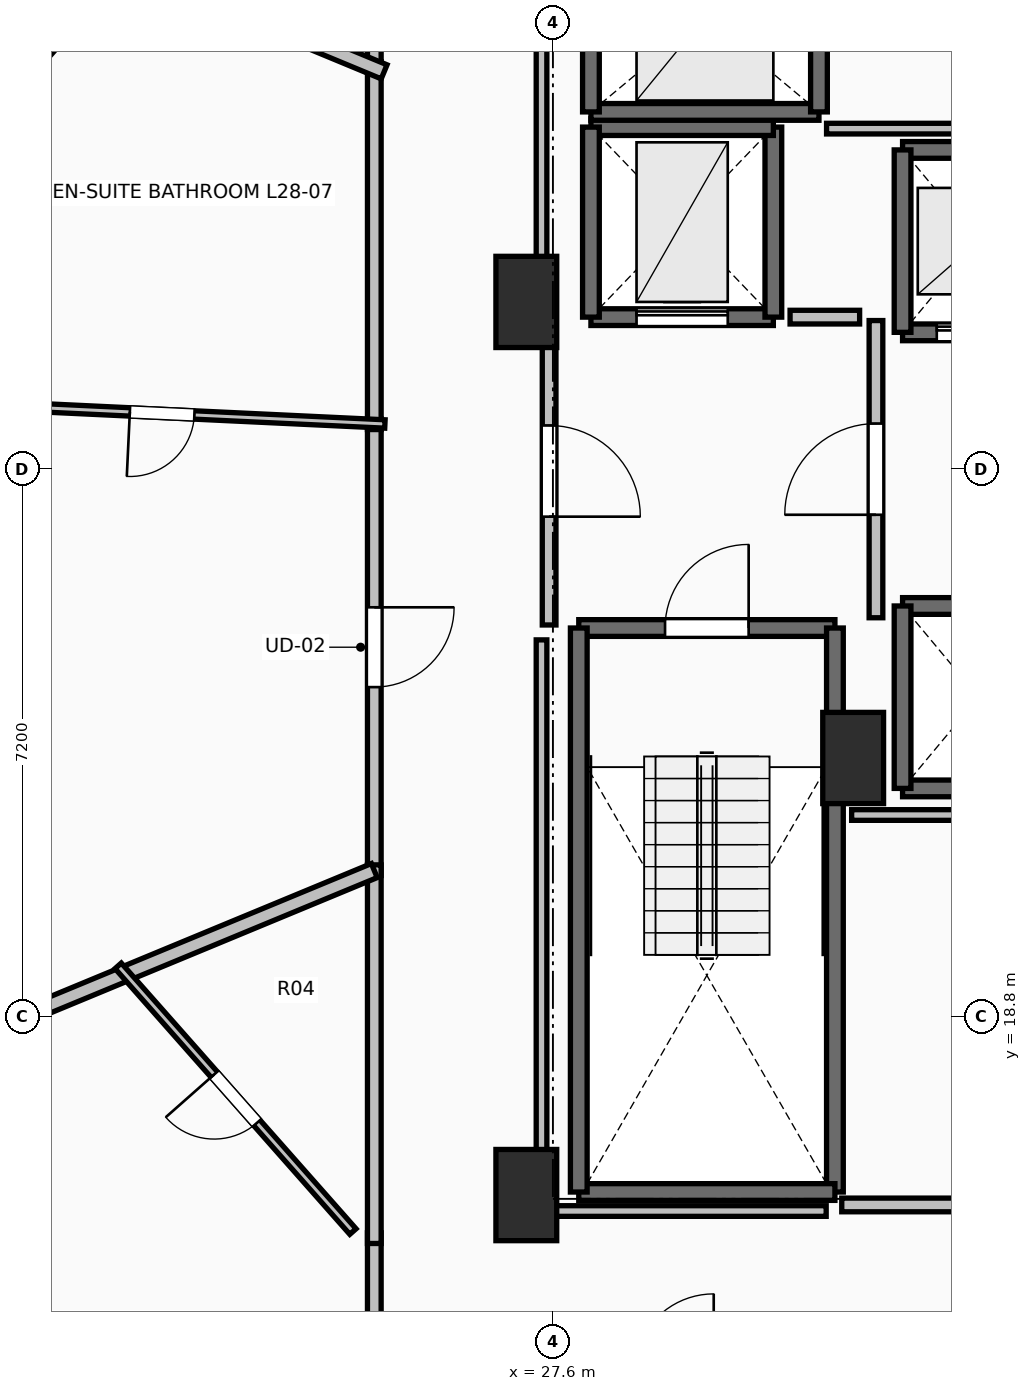
"""IFC4 building model, lengths in metres.
Left out: names, types, materials, properties, quantities, classifications, styles, units other than length and angle.
Written with IfcOpenShell. Run it as: python <this file> out.ifc"""

import sys

from ifc_helpers import new_model, si_unit, direction, frame, frame_2d, origin, origin_2d, place, context, subcontext, project, spatial, rectangle, extrude, element, fill, save


model = new_model("IFC4")
c1 = context("Model", 3, precision=1e-05, world=origin(), true_north=direction((0.0, 1.0)))
c2 = subcontext(c1, "Body", "Model", "MODEL_VIEW")
j1 = project(units=[si_unit("LENGTHUNIT", "METRE"), si_unit("PLANEANGLEUNIT", "RADIAN")], contexts=[c1])
p1 = place(None, origin())
s1 = spatial("IfcSite", under=j1, at=p1, CompositionType="ELEMENT")
p2 = place(p1, origin())
s2 = spatial("IfcBuilding", under=s1, at=p2, CompositionType="ELEMENT")
p3 = place(p2, frame((0.0, 0.0, 106.8)))
s3 = spatial("IfcBuildingStorey", under=s2, at=p3, CompositionType="ELEMENT", Elevation=106.8)
for number, where, z_axis, x_axis in (
    (1, (27.25, 16.45, 0.0), (0.0, 0.0, 1.0), (1.0, 0.0, 0.0)),
    (2, (27.25, 28.2, 0.0), (0.0, 0.0, 1.0), (1.0, 0.0, 0.0)),
    (3, (31.55, 22.2, 0.0), (0.0, 0.0, 1.0), (1.0, 0.0, 0.0)),
):
    element("IfcColumn", number, at=place(p3, frame(where, z_axis=z_axis, x_axis=x_axis)), inside=s3, PredefinedType="PILASTER", context=c2, shape_type="SweptSolid", body=[
        extrude(rectangle(XDim=0.8, YDim=1.2, at=origin_2d()), origin(), (0.0, 0.0, 1.0), 3.5),
    ])
p4 = place(p3, frame((27.94, 23.91, 0.0), z_axis=(0.0, 0.0, 1.0), x_axis=(1.0, 0.0, 0.0)))
e4 = element("IfcWall", 4, at=p4, inside=s3, PredefinedType="SOLIDWALL", context=c2, shape_type="SweptSolid", body=[
    extrude(rectangle(XDim=3.37, YDim=0.22, at=frame_2d((1.685, 0.0))), origin(), (0.0, 0.0, 1.0), 3.24),
])
p5 = place(p4, frame((1.135, 0.0, 0.0)))
e5 = element("IfcOpeningElement", 5, at=p5, cuts=e4, PredefinedType="OPENING", context=c2, shape_type="SweptSolid", body=[
    extrude(rectangle(XDim=1.1, YDim=2.15, at=frame_2d((0.55, 1.075))), frame((0.0, 0.125, 0.0), z_axis=(0.0, -1.0, 0.0), x_axis=(1.0, 0.0, 0.0)), (0.0, 0.0, 1.0), 0.25),
])
p6 = place(p3, frame((31.31, 23.91, 0.0), z_axis=(0.0, 0.0, 1.0), x_axis=(0.0, -1.0, 0.0)))
e6 = element("IfcWall", 6, at=p6, inside=s3, PredefinedType="SOLIDWALL", context=c2, shape_type="SweptSolid", body=[
    extrude(rectangle(XDim=7.42, YDim=0.22, at=frame_2d((3.71, 0.0))), origin(), (0.0, 0.0, 1.0), 3.24),
])
p7 = place(p3, frame((31.31, 16.49, 0.0), z_axis=(0.0, 0.0, 1.0), x_axis=(-1.0, 0.0, 0.0)))
e7 = element("IfcWall", 7, at=p7, inside=s3, PredefinedType="SOLIDWALL", context=c2, shape_type="SweptSolid", body=[
    extrude(rectangle(XDim=3.37, YDim=0.22, at=frame_2d((1.685, 0.0))), origin(), (0.0, 0.0, 1.0), 3.24),
])
p8 = place(p3, frame((27.94, 16.49, 0.0), z_axis=(0.0, 0.0, 1.0), x_axis=(0.0, 1.0, 0.0)))
e8 = element("IfcWall", 8, at=p8, inside=s3, PredefinedType="SOLIDWALL", context=c2, shape_type="SweptSolid", body=[
    extrude(rectangle(XDim=7.42, YDim=0.22, at=frame_2d((3.71, 0.0))), origin(), (0.0, 0.0, 1.0), 3.24),
])
p9 = place(p3, frame((32.2, 27.8, 0.0), z_axis=(0.0, 0.0, 1.0), x_axis=(1.0, 0.0, 0.0)))
e9 = element("IfcWall", 9, at=p9, inside=s3, PredefinedType="SOLIDWALL", context=c2, shape_type="SweptSolid", body=[
    extrude(rectangle(XDim=2.0, YDim=0.22, at=frame_2d((1.0, 0.0))), origin(), (0.0, 0.0, 1.0), 3.24),
])
p10 = place(p9, frame((0.45, 0.0, 0.0)))
e10 = element("IfcOpeningElement", 10, at=p10, cuts=e9, PredefinedType="OPENING", context=c2, shape_type="SweptSolid", body=[
    extrude(rectangle(XDim=1.1, YDim=2.2, at=frame_2d((0.55, 1.1))), frame((0.0, 0.125, 0.0), z_axis=(0.0, -1.0, 0.0), x_axis=(1.0, 0.0, 0.0)), (0.0, 0.0, 1.0), 0.25),
])
p11 = place(p3, frame((34.2, 30.2, 0.0), z_axis=(0.0, 0.0, 1.0), x_axis=(-1.0, 0.0, 0.0)))
e11 = element("IfcWall", 11, at=p11, inside=s3, PredefinedType="SOLIDWALL", context=c2, shape_type="SweptSolid", body=[
    extrude(rectangle(XDim=2.0, YDim=0.22, at=frame_2d((1.0, 0.0))), origin(), (0.0, 0.0, 1.0), 3.24),
])
p12 = place(p3, frame((32.2, 30.2, 0.0), z_axis=(0.0, 0.0, 1.0), x_axis=(0.0, -1.0, 0.0)))
e12 = element("IfcWall", 12, at=p12, inside=s3, PredefinedType="SOLIDWALL", context=c2, shape_type="SweptSolid", body=[
    extrude(rectangle(XDim=2.4, YDim=0.22, at=frame_2d((1.2, 0.0))), origin(), (0.0, 0.0, 1.0), 3.24),
])
for number, where, z_axis, x_axis in (
    (13, (32.2, 21.8, 0.0), (0.0, 0.0, 1.0), (1.0, 0.0, 0.0)),
    (14, (34.2, 24.2, 0.0), (0.0, 0.0, 1.0), (-1.0, 0.0, 0.0)),
):
    element("IfcWall", number, at=place(p3, frame(where, z_axis=z_axis, x_axis=x_axis)), inside=s3, PredefinedType="SOLIDWALL", context=c2, shape_type="SweptSolid", body=[
        extrude(rectangle(XDim=2.0, YDim=0.22, at=frame_2d((1.0, 0.0))), origin(), (0.0, 0.0, 1.0), 3.24),
    ])
p13 = place(p3, frame((32.2, 24.2, 0.0), z_axis=(0.0, 0.0, 1.0), x_axis=(0.0, -1.0, 0.0)))
e15 = element("IfcWall", 15, at=p13, inside=s3, PredefinedType="SOLIDWALL", context=c2, shape_type="SweptSolid", body=[
    extrude(rectangle(XDim=2.4, YDim=0.22, at=frame_2d((1.2, 0.0))), origin(), (0.0, 0.0, 1.0), 3.24),
])
p14 = place(p3, frame((28.1, 28.0, 0.0), z_axis=(0.0, 0.0, 1.0), x_axis=(1.0, 0.0, 0.0)))
e16 = element("IfcWall", 16, at=p14, inside=s3, PredefinedType="SHEAR", context=c2, shape_type="SweptSolid", body=[
    extrude(rectangle(XDim=2.4, YDim=0.22, at=frame_2d((1.2, 0.0))), origin(), (0.0, 0.0, 1.0), 3.24),
])
p15 = place(p14, frame((0.6, 0.0, 0.0)))
e17 = element("IfcOpeningElement", 17, at=p15, cuts=e16, PredefinedType="OPENING", context=c2, shape_type="SweptSolid", body=[
    extrude(rectangle(XDim=1.2, YDim=2.2, at=frame_2d((0.6, 1.1))), frame((0.0, 0.125, 0.0), z_axis=(0.0, -1.0, 0.0), x_axis=(1.0, 0.0, 0.0)), (0.0, 0.0, 1.0), 0.25),
])
p16 = place(p3, frame((30.5, 28.0, 0.0), z_axis=(0.0, 0.0, 1.0), x_axis=(0.0, 1.0, 0.0)))
e18 = element("IfcWall", 18, at=p16, inside=s3, PredefinedType="SHEAR", context=c2, shape_type="SweptSolid", body=[
    extrude(rectangle(XDim=2.5, YDim=0.22, at=frame_2d((1.25, 0.0))), origin(), (0.0, 0.0, 1.0), 3.24),
])
p17 = place(p3, frame((30.5, 30.5, 0.0), z_axis=(0.0, 0.0, 1.0), x_axis=(-1.0, 0.0, 0.0)))
e19 = element("IfcWall", 19, at=p17, inside=s3, PredefinedType="SHEAR", context=c2, shape_type="SweptSolid", body=[
    extrude(rectangle(XDim=2.4, YDim=0.22, at=frame_2d((1.2, 0.0))), origin(), (0.0, 0.0, 1.0), 3.24),
])
p18 = place(p3, frame((28.1, 30.5, 0.0), z_axis=(0.0, 0.0, 1.0), x_axis=(0.0, -1.0, 0.0)))
e20 = element("IfcWall", 20, at=p18, inside=s3, PredefinedType="SHEAR", context=c2, shape_type="SweptSolid", body=[
    extrude(rectangle(XDim=2.5, YDim=0.22, at=frame_2d((1.25, 0.0))), origin(), (0.0, 0.0, 1.0), 3.24),
])
p19 = place(p3, frame((28.1, 30.7, 0.0), z_axis=(0.0, 0.0, 1.0), x_axis=(1.0, 0.0, 0.0)))
e21 = element("IfcWall", 21, at=p19, inside=s3, PredefinedType="SOLIDWALL", context=c2, shape_type="SweptSolid", body=[
    extrude(rectangle(XDim=3.0, YDim=0.22, at=frame_2d((1.5, 0.0))), origin(), (0.0, 0.0, 1.0), 3.24),
])
for number, where, z_axis, x_axis in (
    (22, (31.1, 30.7, 0.0), (0.0, 0.0, 1.0), (0.0, 1.0, 0.0)),
    (23, (28.1, 33.2, 0.0), (0.0, 0.0, 1.0), (0.0, -1.0, 0.0)),
):
    element("IfcWall", number, at=place(p3, frame(where, z_axis=z_axis, x_axis=x_axis)), inside=s3, PredefinedType="SOLIDWALL", context=c2, shape_type="SweptSolid", body=[
        extrude(rectangle(XDim=2.5, YDim=0.22, at=frame_2d((1.25, 0.0))), origin(), (0.0, 0.0, 1.0), 3.24),
    ])
p20 = place(p3, frame((31.85, 24.045, 0.0), z_axis=(0.0, 0.0, 1.0), x_axis=(0.0, 1.0, 0.0)))
e24 = element("IfcWall", 24, at=p20, inside=s3, PredefinedType="PARTITIONING", context=c2, shape_type="SweptSolid", body=[
    extrude(rectangle(XDim=3.91, YDim=0.18, at=frame_2d((1.955, 0.0))), origin(), (0.0, 0.0, 1.0), 3.24),
])
p21 = place(p20, frame((1.355, 0.0, 0.0)))
e25 = element("IfcOpeningElement", 25, at=p21, cuts=e24, PredefinedType="OPENING", context=c2, shape_type="SweptSolid", body=[
    extrude(rectangle(XDim=1.2, YDim=2.15, at=frame_2d((0.6, 1.075))), frame((0.0, 0.105, 0.0), z_axis=(0.0, -1.0, 0.0), x_axis=(1.0, 0.0, 0.0)), (0.0, 0.0, 1.0), 0.21),
])
p22 = place(p3, frame((27.55, 28.0, 0.0), z_axis=(0.0, 0.0, 1.0), x_axis=(0.0, -1.0, 0.0)))
e26 = element("IfcWall", 26, at=p22, inside=s3, PredefinedType="PARTITIONING", context=c2, shape_type="SweptSolid", body=[
    extrude(rectangle(XDim=4.05, YDim=0.18, at=frame_2d((2.025, 0.0))), origin(), (0.0, 0.0, 1.0), 3.24),
])
p23 = place(p22, frame((1.425, 0.0, 0.0)))
e27 = element("IfcOpeningElement", 27, at=p23, cuts=e26, PredefinedType="OPENING", context=c2, shape_type="SweptSolid", body=[
    extrude(rectangle(XDim=1.2, YDim=2.15, at=frame_2d((0.6, 1.075))), frame((0.0, 0.105, 0.0), z_axis=(0.0, -1.0, 0.0), x_axis=(1.0, 0.0, 0.0)), (0.0, 0.0, 1.0), 0.21),
])
p24 = place(p3, frame((31.4, 16.32, 0.0), z_axis=(0.0, 0.0, 1.0), x_axis=(1.0, 0.0, 0.0)))
e28 = element("IfcWall", 28, at=p24, inside=s3, PredefinedType="PARTITIONING", context=c2, shape_type="SweptSolid", body=[
    extrude(rectangle(XDim=4.4, YDim=0.18, at=frame_2d((2.2, 0.0))), origin(), (0.0, 0.0, 1.0), 3.24),
])
p25 = place(p24, frame((1.775, 0.0, 0.0)))
e29 = element("IfcOpeningElement", 29, at=p25, cuts=e28, PredefinedType="OPENING", context=c2, shape_type="SweptSolid", body=[
    extrude(rectangle(XDim=0.85, YDim=2.1, at=frame_2d((0.425, 1.05))), frame((0.0, 0.105, 0.0), z_axis=(0.0, -1.0, 0.0), x_axis=(1.0, 0.0, 0.0)), (0.0, 0.0, 1.0), 0.21),
])
p26 = place(p3, frame((25.25, 35.034, 0.0), z_axis=(0.0, 0.0, 1.0), x_axis=(0.0, -1.0, 0.0)))
e30 = element("IfcWall", 30, at=p26, inside=s3, PredefinedType="PARTITIONING", context=c2, shape_type="SweptSolid", body=[
    extrude(rectangle(XDim=3.813, YDim=0.18, at=frame_2d((1.906, 0.0))), origin(), (0.0, 0.0, 1.0), 2.432),
])
p27 = place(p26, frame((1.406, 0.0, 0.0)))
e31 = element("IfcOpeningElement", 31, at=p27, cuts=e30, PredefinedType="OPENING", context=c2, shape_type="SweptSolid", body=[
    extrude(rectangle(XDim=1.0, YDim=2.15, at=frame_2d((0.5, 1.075))), frame((0.0, 0.105, 0.0), z_axis=(0.0, -1.0, 0.0), x_axis=(1.0, 0.0, 0.0)), (0.0, 0.0, 1.0), 0.21),
])
p28 = place(p3, frame((25.25, 26.661, 0.0), z_axis=(0.0, 0.0, 1.0), x_axis=(0.0, -1.0, 0.0)))
e32 = element("IfcWall", 32, at=p28, inside=s3, PredefinedType="PARTITIONING", context=c2, shape_type="SweptSolid", body=[
    extrude(rectangle(XDim=6.007, YDim=0.18, at=frame_2d((3.003, 0.0))), origin(), (0.0, 0.0, 1.0), 3.24),
])
p29 = place(p28, frame((2.479, 0.0, 0.0)))
e33 = element("IfcOpeningElement", 33, at=p29, cuts=e32, PredefinedType="OPENING", context=c2, shape_type="SweptSolid", body=[
    extrude(rectangle(XDim=1.05, YDim=2.2, at=frame_2d((0.525, 1.1))), frame((0.0, 0.105, 0.0), z_axis=(0.0, -1.0, 0.0), x_axis=(1.0, 0.0, 0.0)), (0.0, 0.0, 1.0), 0.21),
])
p30 = place(p3, frame((25.25, 31.361, 0.0), z_axis=(0.0, 0.0, 1.0), x_axis=(0.0, -1.0, 0.0)))
e34 = element("IfcWall", 34, at=p30, inside=s3, PredefinedType="PARTITIONING", context=c2, shape_type="SweptSolid", body=[
    extrude(rectangle(XDim=4.84, YDim=0.18, at=frame_2d((2.42, 0.0))), origin(), (0.0, 0.0, 1.0), 2.432),
])
p31 = place(p3, frame((25.25, 15.953, 0.0), z_axis=(0.0, 0.0, 1.0), x_axis=(0.0, -1.0, 0.0)))
e35 = element("IfcWall", 35, at=p31, inside=s3, PredefinedType="PARTITIONING", context=c2, shape_type="SweptSolid", body=[
    extrude(rectangle(XDim=1.853, YDim=0.18, at=frame_2d((0.926, 0.0))), origin(), (0.0, 0.0, 1.0), 2.432),
])
p32 = place(p3, frame((25.25, 20.794, 0.0), z_axis=(0.0, 0.0, 1.0), x_axis=(0.0, -1.0, 0.0)))
e36 = element("IfcWall", 36, at=p32, inside=s3, PredefinedType="PARTITIONING", context=c2, shape_type="SweptSolid", body=[
    extrude(rectangle(XDim=4.981, YDim=0.18, at=frame_2d((2.49, 0.0))), origin(), (0.0, 0.0, 1.0), 2.432),
])
p33 = place(p3, frame((21.899, 32.669, 0.0), z_axis=(0.0, 0.0, 1.0), x_axis=(0.923843852071, -0.382769561211, 0.0)))
e37 = element("IfcWall", 37, at=p33, inside=s3, PredefinedType="PARTITIONING", context=c2, shape_type="SweptSolid", body=[
    extrude(rectangle(XDim=3.768, YDim=0.2, at=frame_2d((1.884, 0.0))), origin(), (0.0, 0.0, 1.0), 2.886),
])
p34 = place(p3, frame((25.39, 26.594, 0.0), z_axis=(0.0, 0.0, 1.0), x_axis=(-0.998884920498, 0.047211392719, 0.0)))
e38 = element("IfcWall", 38, at=p34, inside=s3, PredefinedType="PARTITIONING", context=c2, shape_type="SweptSolid", body=[
    extrude(rectangle(XDim=5.869, YDim=0.11, at=frame_2d((2.935, 0.0))), origin(), (0.0, 0.0, 1.0), 2.432),
])
p35 = place(p34, frame((2.51, 0.0, 0.0)))
e39 = element("IfcOpeningElement", 39, at=p35, cuts=e38, PredefinedType="OPENING", context=c2, shape_type="SweptSolid", body=[
    extrude(rectangle(XDim=0.85, YDim=2.1, at=frame_2d((0.425, 1.05))), frame((0.0, 0.07, 0.0), z_axis=(0.0, -1.0, 0.0), x_axis=(1.0, 0.0, 0.0)), (0.0, 0.0, 1.0), 0.14),
])
p36 = place(p3, frame((20.76, 31.266, 0.0), z_axis=(0.0, 0.0, 1.0), x_axis=(0.662047420969, 0.749461948593, 0.0)))
e40 = element("IfcWall", 40, at=p36, inside=s3, PredefinedType="PARTITIONING", context=c2, shape_type="SweptSolid", body=[
    extrude(rectangle(XDim=1.972, YDim=0.11, at=frame_2d((0.986, 0.0))), origin(), (0.0, 0.0, 1.0), 3.24),
])
p37 = place(p3, frame((16.446, 17.072, 0.0), z_axis=(0.0, 0.0, 1.0), x_axis=(0.92387006918, 0.382706278068, 0.0)))
e41 = element("IfcWall", 41, at=p37, inside=s3, PredefinedType="PARTITIONING", context=c2, shape_type="SweptSolid", body=[
    extrude(rectangle(XDim=9.53, YDim=0.2, at=frame_2d((4.765, 0.0))), origin(), (0.0, 0.0, 1.0), 2.432),
])
p38 = place(p3, frame((24.969, 15.97, 0.0), z_axis=(0.0, 0.0, 1.0), x_axis=(-0.662106207726, 0.749410014405, 0.0)))
e42 = element("IfcWall", 42, at=p38, inside=s3, PredefinedType="PARTITIONING", context=c2, shape_type="SweptSolid", body=[
    extrude(rectangle(XDim=4.665, YDim=0.11, at=frame_2d((2.332, 0.0))), origin(), (0.0, 0.0, 1.0), 2.432),
])
p39 = place(p38, frame((1.907, 0.0, 0.0)))
e43 = element("IfcOpeningElement", 43, at=p39, cuts=e42, PredefinedType="OPENING", context=c2, shape_type="SweptSolid", body=[
    extrude(rectangle(XDim=0.85, YDim=2.1, at=frame_2d((0.425, 1.05))), frame((0.0, 0.07, 0.0), z_axis=(0.0, -1.0, 0.0), x_axis=(1.0, 0.0, 0.0)), (0.0, 0.0, 1.0), 0.14),
])
p40 = place(p3, frame((31.635, 28.0, 0.0), z_axis=(0.0, 0.0, 1.0), x_axis=(-1.0, 0.0, 0.0)))
e44 = element("IfcWall", 44, at=p40, inside=s3, PredefinedType="PARTITIONING", context=c2, shape_type="SweptSolid", body=[
    extrude(rectangle(XDim=0.915, YDim=0.18, at=frame_2d((0.458, 0.0))), origin(), (0.0, 0.0, 1.0), 3.24),
])
p41 = place(p3, frame((31.2, 30.48, 0.0), z_axis=(0.0, 0.0, 1.0), x_axis=(1.0, 0.0, 0.0)))
e45 = element("IfcWall", 45, at=p41, inside=s3, PredefinedType="PARTITIONING", context=c2, shape_type="SweptSolid", body=[
    extrude(rectangle(XDim=2.05, YDim=0.14, at=frame_2d((1.025, 0.0))), origin(), (0.0, 0.0, 1.0), 3.24),
])
p42 = place(p3, frame((35.58, 21.45, 0.0), z_axis=(0.0, 0.0, 1.0), x_axis=(-1.0, 0.0, 0.0)))
e46 = element("IfcWall", 46, at=p42, inside=s3, PredefinedType="PARTITIONING", context=c2, shape_type="SweptSolid", body=[
    extrude(rectangle(XDim=4.05, YDim=0.14, at=frame_2d((2.025, 0.0))), origin(), (0.0, 0.0, 1.0), 3.24),
])
p43 = place(p3, frame((31.195, 16.24, 0.0), z_axis=(0.0, 0.0, 1.0), x_axis=(-1.0, 0.0, 0.0)))
e47 = element("IfcWall", 47, at=p43, inside=s3, PredefinedType="PARTITIONING", context=c2, shape_type="SweptSolid", body=[
    extrude(rectangle(XDim=3.745, YDim=0.14, at=frame_2d((1.873, 0.0))), origin(), (0.0, 0.0, 1.0), 2.432),
])
p44 = place(p3, frame((27.45, 16.24, 0.0), z_axis=(0.0, 0.0, 1.0), x_axis=(0.0, 1.0, 0.0)))
e48 = element("IfcWall", 48, at=p44, inside=s3, PredefinedType="PARTITIONING", context=c2, shape_type="SweptSolid", body=[
    extrude(rectangle(XDim=7.514, YDim=0.14, at=frame_2d((3.757, 0.0))), origin(), (0.0, 0.0, 1.0), 2.432),
])
p45 = place(p3, frame((27.45, 28.196, 0.0), z_axis=(0.0, 0.0, 1.0), x_axis=(0.0, 1.0, 0.0)))
e49 = element("IfcWall", 49, at=p45, inside=s3, PredefinedType="PARTITIONING", context=c2, shape_type="SweptSolid", body=[
    extrude(rectangle(XDim=5.254, YDim=0.14, at=frame_2d((2.627, 0.0))), origin(), (0.0, 0.0, 1.0), 2.432),
])
p46 = place(p5, origin())
e50 = element("IfcDoor", 50, at=p46, inside=s3, OperationType="SINGLE_SWING_RIGHT", PredefinedType="DOOR", context=c2, shape_type="SweptSolid", body=[
    extrude(rectangle(XDim=1.1, YDim=2.15, at=frame_2d((0.55, 1.075))), frame((0.0, 0.025, 0.0), z_axis=(0.0, -1.0, 0.0), x_axis=(1.0, 0.0, 0.0)), (0.0, 0.0, 1.0), 0.05),
])
fill(e5, e50)
p47 = place(p10, origin())
e51 = element("IfcDoor", 51, at=p47, inside=s3, OperationType="SLIDING_TO_LEFT", PredefinedType="DOOR", context=c2, shape_type="SweptSolid", body=[
    extrude(rectangle(XDim=1.1, YDim=2.2, at=frame_2d((0.55, 1.1))), frame((0.0, 0.025, 0.0), z_axis=(0.0, -1.0, 0.0), x_axis=(1.0, 0.0, 0.0)), (0.0, 0.0, 1.0), 0.05),
])
fill(e10, e51)
p48 = place(p15, origin())
e52 = element("IfcDoor", 52, at=p48, inside=s3, OperationType="SLIDING_TO_LEFT", PredefinedType="DOOR", context=c2, shape_type="SweptSolid", body=[
    extrude(rectangle(XDim=1.2, YDim=2.2, at=frame_2d((0.6, 1.1))), frame((0.0, 0.025, 0.0), z_axis=(0.0, -1.0, 0.0), x_axis=(1.0, 0.0, 0.0)), (0.0, 0.0, 1.0), 0.05),
])
fill(e17, e52)
p49 = place(p21, origin())
e53 = element("IfcDoor", 53, at=p49, inside=s3, OperationType="SINGLE_SWING_LEFT", PredefinedType="DOOR", context=c2, shape_type="SweptSolid", body=[
    extrude(rectangle(XDim=1.2, YDim=2.15, at=frame_2d((0.6, 1.075))), frame((0.0, 0.025, 0.0), z_axis=(0.0, -1.0, 0.0), x_axis=(1.0, 0.0, 0.0)), (0.0, 0.0, 1.0), 0.05),
])
fill(e25, e53)
p50 = place(p23, origin())
e54 = element("IfcDoor", 54, at=p50, inside=s3, OperationType="SINGLE_SWING_RIGHT", PredefinedType="DOOR", context=c2, shape_type="SweptSolid", body=[
    extrude(rectangle(XDim=1.2, YDim=2.15, at=frame_2d((0.6, 1.075))), frame((0.0, 0.025, 0.0), z_axis=(0.0, -1.0, 0.0), x_axis=(1.0, 0.0, 0.0)), (0.0, 0.0, 1.0), 0.05),
])
fill(e27, e54)
p51 = place(p29, origin())
e55 = element("IfcDoor", 55, at=p51, inside=s3, OperationType="SINGLE_SWING_LEFT", PredefinedType="DOOR", context=c2, shape_type="SweptSolid", body=[
    extrude(rectangle(XDim=1.05, YDim=2.2, at=frame_2d((0.525, 1.1))), frame((0.0, 0.025, 0.0), z_axis=(0.0, -1.0, 0.0), x_axis=(1.0, 0.0, 0.0)), (0.0, 0.0, 1.0), 0.05),
])
fill(e33, e55)
p52 = place(p35, origin())
e56 = element("IfcDoor", 56, at=p52, inside=s3, OperationType="SINGLE_SWING_RIGHT", PredefinedType="DOOR", context=c2, shape_type="SweptSolid", body=[
    extrude(rectangle(XDim=0.85, YDim=2.1, at=frame_2d((0.425, 1.05))), frame((0.0, 0.025, 0.0), z_axis=(0.0, -1.0, 0.0), x_axis=(1.0, 0.0, 0.0)), (0.0, 0.0, 1.0), 0.05),
])
fill(e39, e56)
p53 = place(p39, origin())
e57 = element("IfcDoor", 57, at=p53, inside=s3, OperationType="SINGLE_SWING_RIGHT", PredefinedType="DOOR", context=c2, shape_type="SweptSolid", body=[
    extrude(rectangle(XDim=0.85, YDim=2.1, at=frame_2d((0.425, 1.05))), frame((0.0, 0.025, 0.0), z_axis=(0.0, -1.0, 0.0), x_axis=(1.0, 0.0, 0.0)), (0.0, 0.0, 1.0), 0.05),
])
fill(e43, e57)
save(model, sys.argv[1])
